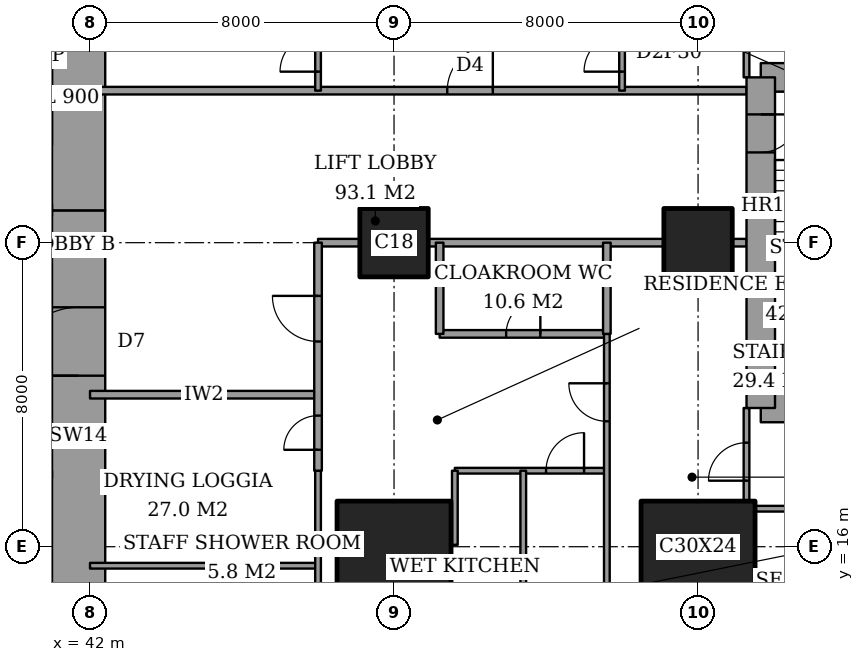
"""IFC4 building model, lengths in metres.
Left out: names, types, materials, properties, quantities, classifications, styles, units other than length and angle.
Written with IfcOpenShell. Run it as: python <this file> out.ifc"""

import sys

from ifc_helpers import new_model, si_unit, direction, frame, frame_2d, origin, origin_2d, place, context, subcontext, project, spatial, rectangle, extrude, element, fill, save


model = new_model("IFC4")
c1 = context("Model", 3, precision=1e-05, world=origin(), true_north=direction((0.0, 1.0)))
c2 = subcontext(c1, "Body", "Model", "MODEL_VIEW")
j1 = project(units=[si_unit("LENGTHUNIT", "METRE"), si_unit("PLANEANGLEUNIT", "RADIAN")], contexts=[c1])
p1 = place(None, origin())
s1 = spatial("IfcSite", under=j1, at=p1, CompositionType="ELEMENT")
p2 = place(p1, origin())
s2 = spatial("IfcBuilding", under=s1, at=p2, CompositionType="ELEMENT")
p3 = place(p2, frame((0.0, 0.0, 189.4)))
s3 = spatial("IfcBuildingStorey", under=s2, at=p3, CompositionType="ELEMENT", Elevation=189.4)
p4 = place(p3, frame((50.0, 16.0, 0.0), z_axis=(0.0, 0.0, 1.0), x_axis=(1.0, 0.0, 0.0)))
e1 = element("IfcColumn", 1, at=p4, inside=s3, PredefinedType="COLUMN", context=c2, shape_type="SweptSolid", body=[
    extrude(rectangle(XDim=3.0, YDim=2.4, at=origin_2d()), origin(), (0.0, 0.0, 1.0), 3.6),
])
p5 = place(p3, frame((50.0, 24.0, 0.0), z_axis=(0.0, 0.0, 1.0), x_axis=(1.0, 0.0, 0.0)))
e2 = element("IfcColumn", 2, at=p5, inside=s3, PredefinedType="COLUMN", context=c2, shape_type="SweptSolid", body=[
    extrude(rectangle(XDim=1.8, YDim=1.8, at=origin_2d()), origin(), (0.0, 0.0, 1.0), 3.6),
])
p6 = place(p3, frame((58.0, 16.0, 0.0), z_axis=(0.0, 0.0, 1.0), x_axis=(1.0, 0.0, 0.0)))
e3 = element("IfcColumn", 3, at=p6, inside=s3, PredefinedType="COLUMN", context=c2, shape_type="SweptSolid", body=[
    extrude(rectangle(XDim=3.0, YDim=2.4, at=origin_2d()), origin(), (0.0, 0.0, 1.0), 3.6),
])
p7 = place(p3, frame((58.0, 24.0, 0.0), z_axis=(0.0, 0.0, 1.0), x_axis=(1.0, 0.0, 0.0)))
e4 = element("IfcColumn", 4, at=p7, inside=s3, PredefinedType="COLUMN", context=c2, shape_type="SweptSolid", body=[
    extrude(rectangle(XDim=1.8, YDim=1.8, at=origin_2d()), origin(), (0.0, 0.0, 1.0), 3.6),
])
p8 = place(p3, frame((41.7, 13.0, 0.0), z_axis=(0.0, 0.0, 1.0), x_axis=(0.0, 1.0, 0.0)))
e5 = element("IfcWall", 5, at=p8, inside=s3, PredefinedType="SHEAR", context=c2, shape_type="SweptSolid", body=[
    extrude(rectangle(XDim=11.85, YDim=1.4, at=frame_2d((5.925, 0.0))), origin(), (0.0, 0.0, 1.0), 3.6),
])
p9 = place(p8, frame((7.5, 0.0, 0.0)))
e6 = element("IfcOpeningElement", 6, at=p9, cuts=e5, PredefinedType="OPENING", context=c2, shape_type="SweptSolid", body=[
    extrude(rectangle(XDim=1.8, YDim=2.4, at=frame_2d((0.9, 1.2))), frame((0.0, 0.71, 0.0), z_axis=(0.0, -1.0, 0.0), x_axis=(1.0, 0.0, 0.0)), (0.0, 0.0, 1.0), 1.42),
])
p10 = place(p3, frame((41.7, 24.85, 0.0), z_axis=(0.0, 0.0, 1.0), x_axis=(0.0, 1.0, 0.0)))
e7 = element("IfcWall", 7, at=p10, inside=s3, PredefinedType="SHEAR", context=c2, shape_type="SweptSolid", body=[
    extrude(rectangle(XDim=10.15, YDim=1.4, at=frame_2d((5.075, 0.0))), origin(), (0.0, 0.0, 1.0), 3.6),
])
for number, where, z_axis, x_axis in (
    (8, (59.65, 19.65, 0.0), (0.0, 0.0, 1.0), (1.0, 0.0, 0.0)),
    (9, (64.1, 28.35, 0.0), (0.0, 0.0, 1.0), (-1.0, 0.0, 0.0)),
):
    element("IfcWall", number, at=place(p3, frame(where, z_axis=z_axis, x_axis=x_axis)), inside=s3, PredefinedType="SHEAR", context=c2, shape_type="SweptSolid", body=[
        extrude(rectangle(XDim=4.45, YDim=0.75, at=frame_2d((2.225, 0.0))), origin(), (0.0, 0.0, 1.0), 3.6),
    ])
p11 = place(p3, frame((59.65, 28.35, 0.0), z_axis=(0.0, 0.0, 1.0), x_axis=(0.0, -1.0, 0.0)))
e10 = element("IfcWall", 10, at=p11, inside=s3, PredefinedType="SHEAR", context=c2, shape_type="SweptSolid", body=[
    extrude(rectangle(XDim=8.7, YDim=0.75, at=frame_2d((4.35, 0.0))), origin(), (0.0, 0.0, 1.0), 3.6),
])
p12 = place(p11, frame((0.975, 0.0, 0.0)))
e11 = element("IfcOpeningElement", 11, at=p12, cuts=e10, PredefinedType="OPENING", context=c2, shape_type="SweptSolid", body=[
    extrude(rectangle(XDim=1.0, YDim=2.1, at=frame_2d((0.5, 1.05))), frame((0.0, 0.385, 0.0), z_axis=(0.0, -1.0, 0.0), x_axis=(1.0, 0.0, 0.0)), (0.0, 0.0, 1.0), 0.77),
])
p13 = place(p3, frame((42.0, 15.5, 0.0), z_axis=(0.0, 0.0, 1.0), x_axis=(1.0, 0.0, 0.0)))
e12 = element("IfcWall", 12, at=p13, inside=s3, PredefinedType="PARTITIONING", context=c2, shape_type="SweptSolid", body=[
    extrude(rectangle(XDim=6.0, YDim=0.15, at=frame_2d((3.0, 0.0))), origin(), (0.0, 0.0, 1.0), 3.35),
])
p14 = place(p3, frame((48.0, 16.05, 0.0), z_axis=(0.0, 0.0, 1.0), x_axis=(1.0, 0.0, 0.0)))
e13 = element("IfcWall", 13, at=p14, inside=s3, PredefinedType="PARTITIONING", context=c2, shape_type="SweptSolid", body=[
    extrude(rectangle(XDim=0.5, YDim=0.15, at=frame_2d((0.25, 0.0))), origin(), (0.0, 0.0, 1.0), 2.634),
])
p15 = place(p3, frame((59.5, 17.0, 0.0), z_axis=(0.0, 0.0, 1.0), x_axis=(1.0, 0.0, 0.0)))
e14 = element("IfcWall", 14, at=p15, inside=s3, PredefinedType="PARTITIONING", context=c2, shape_type="SweptSolid", body=[
    extrude(rectangle(XDim=6.95, YDim=0.15, at=frame_2d((3.475, 0.0))), origin(), (0.0, 0.0, 1.0), 3.35),
])
p16 = place(p3, frame((51.6, 18.0, 0.0), z_axis=(0.0, 0.0, 1.0), x_axis=(1.0, 0.0, 0.0)))
e15 = element("IfcWall", 15, at=p16, inside=s3, PredefinedType="PARTITIONING", context=c2, shape_type="SweptSolid", body=[
    extrude(rectangle(XDim=4.0, YDim=0.15, at=frame_2d((2.0, 0.0))), origin(), (0.0, 0.0, 1.0), 3.35),
])
p17 = place(p16, frame((2.4, 0.0, 0.0)))
e16 = element("IfcOpeningElement", 16, at=p17, cuts=e15, PredefinedType="OPENING", context=c2, shape_type="SweptSolid", body=[
    extrude(rectangle(XDim=1.0, YDim=2.1, at=frame_2d((0.5, 1.05))), frame((0.0, 0.085, 0.0), z_axis=(0.0, -1.0, 0.0), x_axis=(1.0, 0.0, 0.0)), (0.0, 0.0, 1.0), 0.17),
])
p18 = place(p3, frame((42.0, 20.0, 0.0), z_axis=(0.0, 0.0, 1.0), x_axis=(1.0, 0.0, 0.0)))
e17 = element("IfcWall", 17, at=p18, inside=s3, PredefinedType="PARTITIONING", context=c2, shape_type="SweptSolid", body=[
    extrude(rectangle(XDim=6.0, YDim=0.2, at=frame_2d((3.0, 0.0))), origin(), (0.0, 0.0, 1.0), 3.35),
])
p19 = place(p3, frame((51.2, 21.6, 0.0), z_axis=(0.0, 0.0, 1.0), x_axis=(1.0, 0.0, 0.0)))
e18 = element("IfcWall", 18, at=p19, inside=s3, PredefinedType="PARTITIONING", context=c2, shape_type="SweptSolid", body=[
    extrude(rectangle(XDim=4.4, YDim=0.2, at=frame_2d((2.2, 0.0))), origin(), (0.0, 0.0, 1.0), 3.35),
])
p20 = place(p19, frame((1.75, 0.0, 0.0)))
e19 = element("IfcOpeningElement", 19, at=p20, cuts=e18, PredefinedType="OPENING", context=c2, shape_type="SweptSolid", body=[
    extrude(rectangle(XDim=0.9, YDim=2.1, at=frame_2d((0.45, 1.05))), frame((0.0, 0.11, 0.0), z_axis=(0.0, -1.0, 0.0), x_axis=(1.0, 0.0, 0.0)), (0.0, 0.0, 1.0), 0.22),
])
p21 = place(p3, frame((48.0, 24.0, 0.0), z_axis=(0.0, 0.0, 1.0), x_axis=(1.0, 0.0, 0.0)))
e20 = element("IfcWall", 20, at=p21, inside=s3, PredefinedType="PARTITIONING", context=c2, shape_type="SweptSolid", body=[
    extrude(rectangle(XDim=1.1, YDim=0.2, at=frame_2d((0.55, 0.0))), origin(), (0.0, 0.0, 1.0), 3.35),
])
p22 = place(p3, frame((50.9, 24.0, 0.0), z_axis=(0.0, 0.0, 1.0), x_axis=(1.0, 0.0, 0.0)))
e21 = element("IfcWall", 21, at=p22, inside=s3, PredefinedType="PARTITIONING", context=c2, shape_type="SweptSolid", body=[
    extrude(rectangle(XDim=6.2, YDim=0.2, at=frame_2d((3.1, 0.0))), origin(), (0.0, 0.0, 1.0), 3.35),
])
p23 = place(p3, frame((58.9, 24.0, 0.0), z_axis=(0.0, 0.0, 1.0), x_axis=(1.0, 0.0, 0.0)))
e22 = element("IfcWall", 22, at=p23, inside=s3, PredefinedType="PARTITIONING", context=c2, shape_type="SweptSolid", body=[
    extrude(rectangle(XDim=0.375, YDim=0.2, at=frame_2d((0.188, 0.0))), origin(), (0.0, 0.0, 1.0), 3.35),
])
p24 = place(p3, frame((42.0, 28.0, 0.0), z_axis=(0.0, 0.0, 1.0), x_axis=(1.0, 0.0, 0.0)))
e23 = element("IfcWall", 23, at=p24, inside=s3, PredefinedType="PARTITIONING", context=c2, shape_type="SweptSolid", body=[
    extrude(rectangle(XDim=17.275, YDim=0.2, at=frame_2d((8.637, 0.0))), origin(), (0.0, 0.0, 1.0), 3.35),
])
p25 = place(p24, frame((9.4, 0.0, 0.0)))
e24 = element("IfcOpeningElement", 24, at=p25, cuts=e23, PredefinedType="OPENING", context=c2, shape_type="SweptSolid", body=[
    extrude(rectangle(XDim=1.2, YDim=2.4, at=frame_2d((0.6, 1.2))), frame((0.0, 0.11, 0.0), z_axis=(0.0, -1.0, 0.0), x_axis=(1.0, 0.0, 0.0)), (0.0, 0.0, 1.0), 0.22),
])
p26 = place(p3, frame((45.6, 13.1, 0.0), z_axis=(0.0, 0.0, 1.0), x_axis=(0.0, 1.0, 0.0)))
e25 = element("IfcWall", 25, at=p26, inside=s3, PredefinedType="PARTITIONING", context=c2, shape_type="SweptSolid", body=[
    extrude(rectangle(XDim=2.4, YDim=0.15, at=frame_2d((1.2, 0.0))), origin(), (0.0, 0.0, 1.0), 3.35),
])
p27 = place(p26, frame((0.75, 0.0, 0.0)))
e26 = element("IfcOpeningElement", 26, at=p27, cuts=e25, PredefinedType="OPENING", context=c2, shape_type="SweptSolid", body=[
    extrude(rectangle(XDim=0.9, YDim=2.1, at=frame_2d((0.45, 1.05))), frame((0.0, 0.085, 0.0), z_axis=(0.0, -1.0, 0.0), x_axis=(1.0, 0.0, 0.0)), (0.0, 0.0, 1.0), 0.17),
])
p28 = place(p3, frame((48.0, 18.0, 0.0), z_axis=(0.0, 0.0, 1.0), x_axis=(0.0, 1.0, 0.0)))
e27 = element("IfcWall", 27, at=p28, inside=s3, PredefinedType="PARTITIONING", context=c2, shape_type="SweptSolid", body=[
    extrude(rectangle(XDim=6.0, YDim=0.2, at=frame_2d((3.0, 0.0))), origin(), (0.0, 0.0, 1.0), 3.35),
])
p29 = place(p28, frame((3.4, 0.0, 0.0)))
e28 = element("IfcOpeningElement", 28, at=p29, cuts=e27, PredefinedType="OPENING", context=c2, shape_type="SweptSolid", body=[
    extrude(rectangle(XDim=1.2, YDim=2.4, at=frame_2d((0.6, 1.2))), frame((0.0, 0.11, 0.0), z_axis=(0.0, -1.0, 0.0), x_axis=(1.0, 0.0, 0.0)), (0.0, 0.0, 1.0), 0.22),
])
p30 = place(p28, frame((0.55, 0.0, 0.0)))
e29 = element("IfcOpeningElement", 29, at=p30, cuts=e27, PredefinedType="OPENING", context=c2, shape_type="SweptSolid", body=[
    extrude(rectangle(XDim=0.9, YDim=2.1, at=frame_2d((0.45, 1.05))), frame((0.0, 0.11, 0.0), z_axis=(0.0, -1.0, 0.0), x_axis=(1.0, 0.0, 0.0)), (0.0, 0.0, 1.0), 0.22),
])
p31 = place(p3, frame((48.0, 11.2, 0.0), z_axis=(0.0, 0.0, 1.0), x_axis=(0.0, 1.0, 0.0)))
e30 = element("IfcWall", 30, at=p31, inside=s3, PredefinedType="PARTITIONING", context=c2, shape_type="SweptSolid", body=[
    extrude(rectangle(XDim=6.8, YDim=0.15, at=frame_2d((3.4, 0.0))), origin(), (0.0, 0.0, 1.0), 3.35),
])
p32 = place(p3, frame((48.0, 28.0, 0.0), z_axis=(0.0, 0.0, 1.0), x_axis=(0.0, 1.0, 0.0)))
e31 = element("IfcWall", 31, at=p32, inside=s3, PredefinedType="PARTITIONING", context=c2, shape_type="SweptSolid", body=[
    extrude(rectangle(XDim=9.4, YDim=0.15, at=frame_2d((4.7, 0.0))), origin(), (0.0, 0.0, 1.0), 3.35),
])
p33 = place(p32, frame((0.5, 0.0, 0.0)))
e32 = element("IfcOpeningElement", 32, at=p33, cuts=e31, PredefinedType="OPENING", context=c2, shape_type="SweptSolid", body=[
    extrude(rectangle(XDim=1.0, YDim=2.1, at=frame_2d((0.5, 1.05))), frame((0.0, 0.085, 0.0), z_axis=(0.0, -1.0, 0.0), x_axis=(1.0, 0.0, 0.0)), (0.0, 0.0, 1.0), 0.17),
])
p34 = place(p3, frame((51.2, 21.6, 0.0), z_axis=(0.0, 0.0, 1.0), x_axis=(0.0, 1.0, 0.0)))
e33 = element("IfcWall", 33, at=p34, inside=s3, PredefinedType="PARTITIONING", context=c2, shape_type="SweptSolid", body=[
    extrude(rectangle(XDim=2.4, YDim=0.2, at=frame_2d((1.2, 0.0))), origin(), (0.0, 0.0, 1.0), 3.35),
])
p35 = place(p3, frame((51.6, 16.05, 0.0), z_axis=(0.0, 0.0, 1.0), x_axis=(0.0, 1.0, 0.0)))
e34 = element("IfcWall", 34, at=p35, inside=s3, PredefinedType="PARTITIONING", context=c2, shape_type="SweptSolid", body=[
    extrude(rectangle(XDim=1.95, YDim=0.15, at=frame_2d((0.975, 0.0))), origin(), (0.0, 0.0, 1.0), 3.35),
])
p36 = place(p3, frame((53.4, 11.2, 0.0), z_axis=(0.0, 0.0, 1.0), x_axis=(0.0, 1.0, 0.0)))
e35 = element("IfcWall", 35, at=p36, inside=s3, PredefinedType="PARTITIONING", context=c2, shape_type="SweptSolid", body=[
    extrude(rectangle(XDim=6.8, YDim=0.15, at=frame_2d((3.4, 0.0))), origin(), (0.0, 0.0, 1.0), 3.35),
])
p37 = place(p3, frame((55.6, 21.6, 0.0), z_axis=(0.0, 0.0, 1.0), x_axis=(0.0, 1.0, 0.0)))
e36 = element("IfcWall", 36, at=p37, inside=s3, PredefinedType="PARTITIONING", context=c2, shape_type="SweptSolid", body=[
    extrude(rectangle(XDim=2.4, YDim=0.2, at=frame_2d((1.2, 0.0))), origin(), (0.0, 0.0, 1.0), 3.35),
])
p38 = place(p3, frame((55.6, 14.6, 0.0), z_axis=(0.0, 0.0, 1.0), x_axis=(0.0, 1.0, 0.0)))
e37 = element("IfcWall", 37, at=p38, inside=s3, PredefinedType="PARTITIONING", context=c2, shape_type="SweptSolid", body=[
    extrude(rectangle(XDim=7.0, YDim=0.15, at=frame_2d((3.5, 0.0))), origin(), (0.0, 0.0, 1.0), 3.35),
])
p39 = place(p38, frame((4.7, 0.0, 0.0)))
e38 = element("IfcOpeningElement", 38, at=p39, cuts=e37, PredefinedType="OPENING", context=c2, shape_type="SweptSolid", body=[
    extrude(rectangle(XDim=1.0, YDim=2.1, at=frame_2d((0.5, 1.05))), frame((0.0, 0.085, 0.0), z_axis=(0.0, -1.0, 0.0), x_axis=(1.0, 0.0, 0.0)), (0.0, 0.0, 1.0), 0.17),
])
p40 = place(p3, frame((56.0, 28.0, 0.0), z_axis=(0.0, 0.0, 1.0), x_axis=(0.0, 1.0, 0.0)))
e39 = element("IfcWall", 39, at=p40, inside=s3, PredefinedType="PARTITIONING", context=c2, shape_type="SweptSolid", body=[
    extrude(rectangle(XDim=9.4, YDim=0.15, at=frame_2d((4.7, 0.0))), origin(), (0.0, 0.0, 1.0), 3.35),
])
p41 = place(p40, frame((0.5, 0.0, 0.0)))
e40 = element("IfcOpeningElement", 40, at=p41, cuts=e39, PredefinedType="OPENING", context=c2, shape_type="SweptSolid", body=[
    extrude(rectangle(XDim=1.0, YDim=2.1, at=frame_2d((0.5, 1.05))), frame((0.0, 0.085, 0.0), z_axis=(0.0, -1.0, 0.0), x_axis=(1.0, 0.0, 0.0)), (0.0, 0.0, 1.0), 0.17),
])
p42 = place(p3, frame((59.275, 17.2, 0.0), z_axis=(0.0, 0.0, 1.0), x_axis=(0.0, 1.0, 0.0)))
e41 = element("IfcWall", 41, at=p42, inside=s3, PredefinedType="PARTITIONING", context=c2, shape_type="SweptSolid", body=[
    extrude(rectangle(XDim=2.45, YDim=0.15, at=frame_2d((1.225, 0.0))), origin(), (0.0, 0.0, 1.0), 3.35),
])
p43 = place(p42, frame((0.538, 0.0, 0.0)))
e42 = element("IfcOpeningElement", 42, at=p43, cuts=e41, PredefinedType="OPENING", context=c2, shape_type="SweptSolid", body=[
    extrude(rectangle(XDim=1.0, YDim=2.1, at=frame_2d((0.5, 1.05))), frame((0.0, 0.085, 0.0), z_axis=(0.0, -1.0, 0.0), x_axis=(1.0, 0.0, 0.0)), (0.0, 0.0, 1.0), 0.17),
])
p44 = place(p3, frame((59.275, 28.35, 0.0), z_axis=(0.0, 0.0, 1.0), x_axis=(0.0, 1.0, 0.0)))
e43 = element("IfcWall", 43, at=p44, inside=s3, PredefinedType="PARTITIONING", context=c2, shape_type="SweptSolid", body=[
    extrude(rectangle(XDim=2.45, YDim=0.15, at=frame_2d((1.225, 0.0))), origin(), (0.0, 0.0, 1.0), 3.35),
])
p45 = place(p44, frame((0.962, 0.0, 0.0)))
e44 = element("IfcOpeningElement", 44, at=p45, cuts=e43, PredefinedType="OPENING", context=c2, shape_type="SweptSolid", body=[
    extrude(rectangle(XDim=0.9, YDim=2.1, at=frame_2d((0.45, 1.05))), frame((0.0, 0.085, 0.0), z_axis=(0.0, -1.0, 0.0), x_axis=(1.0, 0.0, 0.0)), (0.0, 0.0, 1.0), 0.17),
])
p46 = place(p3, frame((28.3, 17.9, 0.0), z_axis=(0.0, 0.0, 1.0), x_axis=(1.0, 0.0, 0.0)))
e45 = element("IfcWall", 45, at=p46, inside=s3, PredefinedType="PARTITIONING", context=c2, shape_type="SweptSolid", body=[
    extrude(rectangle(XDim=12.7, YDim=0.2, at=frame_2d((6.35, 0.0))), origin(), (0.0, 0.0, 1.0), 3.6),
])
p47 = place(p46, frame((1.05, 0.0, 0.0)))
e46 = element("IfcOpeningElement", 46, at=p47, cuts=e45, PredefinedType="OPENING", context=c2, shape_type="SweptSolid", body=[
    extrude(rectangle(XDim=0.9, YDim=2.1, at=frame_2d((0.45, 1.05))), frame((0.0, 0.11, 0.0), z_axis=(0.0, -1.0, 0.0), x_axis=(1.0, 0.0, 0.0)), (0.0, 0.0, 1.0), 0.22),
])
p48 = place(p46, frame((10.6, 0.0, 0.0)))
e47 = element("IfcOpeningElement", 47, at=p48, cuts=e45, PredefinedType="OPENING", context=c2, shape_type="SweptSolid", body=[
    extrude(rectangle(XDim=1.2, YDim=2.1, at=frame_2d((0.6, 1.05))), frame((0.0, 0.11, 0.0), z_axis=(0.0, -1.0, 0.0), x_axis=(1.0, 0.0, 0.0)), (0.0, 0.0, 1.0), 0.22),
])
p49 = place(p43, origin())
e48 = element("IfcDoor", 48, at=p49, inside=s3, OperationType="SINGLE_SWING_RIGHT", PredefinedType="DOOR", context=c2, shape_type="SweptSolid", body=[
    extrude(rectangle(XDim=1.0, YDim=2.1, at=frame_2d((0.5, 1.05))), frame((0.0, 0.025, 0.0), z_axis=(0.0, -1.0, 0.0), x_axis=(1.0, 0.0, 0.0)), (0.0, 0.0, 1.0), 0.05),
])
fill(e42, e48)
p50 = place(p39, origin())
e49 = element("IfcDoor", 49, at=p50, inside=s3, OperationType="SINGLE_SWING_LEFT", PredefinedType="DOOR", context=c2, shape_type="SweptSolid", body=[
    extrude(rectangle(XDim=1.0, YDim=2.1, at=frame_2d((0.5, 1.05))), frame((0.0, 0.025, 0.0), z_axis=(0.0, -1.0, 0.0), x_axis=(1.0, 0.0, 0.0)), (0.0, 0.0, 1.0), 0.05),
])
fill(e38, e49)
p51 = place(p20, origin())
e50 = element("IfcDoor", 50, at=p51, inside=s3, OperationType="SINGLE_SWING_LEFT", PredefinedType="DOOR", context=c2, shape_type="SweptSolid", body=[
    extrude(rectangle(XDim=0.9, YDim=2.1, at=frame_2d((0.45, 1.05))), frame((0.0, 0.025, 0.0), z_axis=(0.0, -1.0, 0.0), x_axis=(1.0, 0.0, 0.0)), (0.0, 0.0, 1.0), 0.05),
])
fill(e19, e50)
p52 = place(p29, origin())
e51 = element("IfcDoor", 51, at=p52, inside=s3, OperationType="SINGLE_SWING_LEFT", PredefinedType="DOOR", context=c2, shape_type="SweptSolid", body=[
    extrude(rectangle(XDim=1.2, YDim=2.4, at=frame_2d((0.6, 1.2))), frame((0.0, 0.025, 0.0), z_axis=(0.0, -1.0, 0.0), x_axis=(1.0, 0.0, 0.0)), (0.0, 0.0, 1.0), 0.05),
])
fill(e28, e51)
p53 = place(p17, origin())
e52 = element("IfcDoor", 52, at=p53, inside=s3, OperationType="SINGLE_SWING_LEFT", PredefinedType="DOOR", context=c2, shape_type="SweptSolid", body=[
    extrude(rectangle(XDim=1.0, YDim=2.1, at=frame_2d((0.5, 1.05))), frame((0.0, 0.025, 0.0), z_axis=(0.0, -1.0, 0.0), x_axis=(1.0, 0.0, 0.0)), (0.0, 0.0, 1.0), 0.05),
])
fill(e16, e52)
p54 = place(p30, origin())
e53 = element("IfcDoor", 53, at=p54, inside=s3, OperationType="SINGLE_SWING_RIGHT", PredefinedType="DOOR", context=c2, shape_type="SweptSolid", body=[
    extrude(rectangle(XDim=0.9, YDim=2.1, at=frame_2d((0.45, 1.05))), frame((0.0, 0.025, 0.0), z_axis=(0.0, -1.0, 0.0), x_axis=(1.0, 0.0, 0.0)), (0.0, 0.0, 1.0), 0.05),
])
fill(e29, e53)
p55 = place(p41, origin())
e54 = element("IfcDoor", 54, at=p55, inside=s3, OperationType="SINGLE_SWING_RIGHT", PredefinedType="DOOR", context=c2, shape_type="SweptSolid", body=[
    extrude(rectangle(XDim=1.0, YDim=2.1, at=frame_2d((0.5, 1.05))), frame((0.0, 0.025, 0.0), z_axis=(0.0, -1.0, 0.0), x_axis=(1.0, 0.0, 0.0)), (0.0, 0.0, 1.0), 0.05),
])
fill(e40, e54)
p56 = place(p25, origin())
e55 = element("IfcDoor", 55, at=p56, inside=s3, OperationType="SINGLE_SWING_LEFT", PredefinedType="DOOR", context=c2, shape_type="SweptSolid", body=[
    extrude(rectangle(XDim=1.2, YDim=2.4, at=frame_2d((0.6, 1.2))), frame((0.0, 0.025, 0.0), z_axis=(0.0, -1.0, 0.0), x_axis=(1.0, 0.0, 0.0)), (0.0, 0.0, 1.0), 0.05),
])
fill(e24, e55)
p57 = place(p33, origin())
e56 = element("IfcDoor", 56, at=p57, inside=s3, OperationType="SINGLE_SWING_RIGHT", PredefinedType="DOOR", context=c2, shape_type="SweptSolid", body=[
    extrude(rectangle(XDim=1.0, YDim=2.1, at=frame_2d((0.5, 1.05))), frame((0.0, 0.025, 0.0), z_axis=(0.0, -1.0, 0.0), x_axis=(1.0, 0.0, 0.0)), (0.0, 0.0, 1.0), 0.05),
])
fill(e32, e56)
p58 = place(p9, origin())
e57 = element("IfcDoor", 57, at=p58, inside=s3, OperationType="DOUBLE_DOOR_DOUBLE_SWING", PredefinedType="DOOR", context=c2, shape_type="SweptSolid", body=[
    extrude(rectangle(XDim=1.8, YDim=2.4, at=frame_2d((0.9, 1.2))), frame((0.0, 0.025, 0.0), z_axis=(0.0, -1.0, 0.0), x_axis=(1.0, 0.0, 0.0)), (0.0, 0.0, 1.0), 0.05),
])
fill(e6, e57)
p59 = place(p12, origin())
e58 = element("IfcDoor", 58, at=p59, inside=s3, OperationType="SINGLE_SWING_RIGHT", PredefinedType="DOOR", context=c2, shape_type="SweptSolid", body=[
    extrude(rectangle(XDim=1.0, YDim=2.1, at=frame_2d((0.5, 1.05))), frame((0.0, 0.025, 0.0), z_axis=(0.0, -1.0, 0.0), x_axis=(1.0, 0.0, 0.0)), (0.0, 0.0, 1.0), 0.05),
])
fill(e11, e58)
save(model, sys.argv[1])
